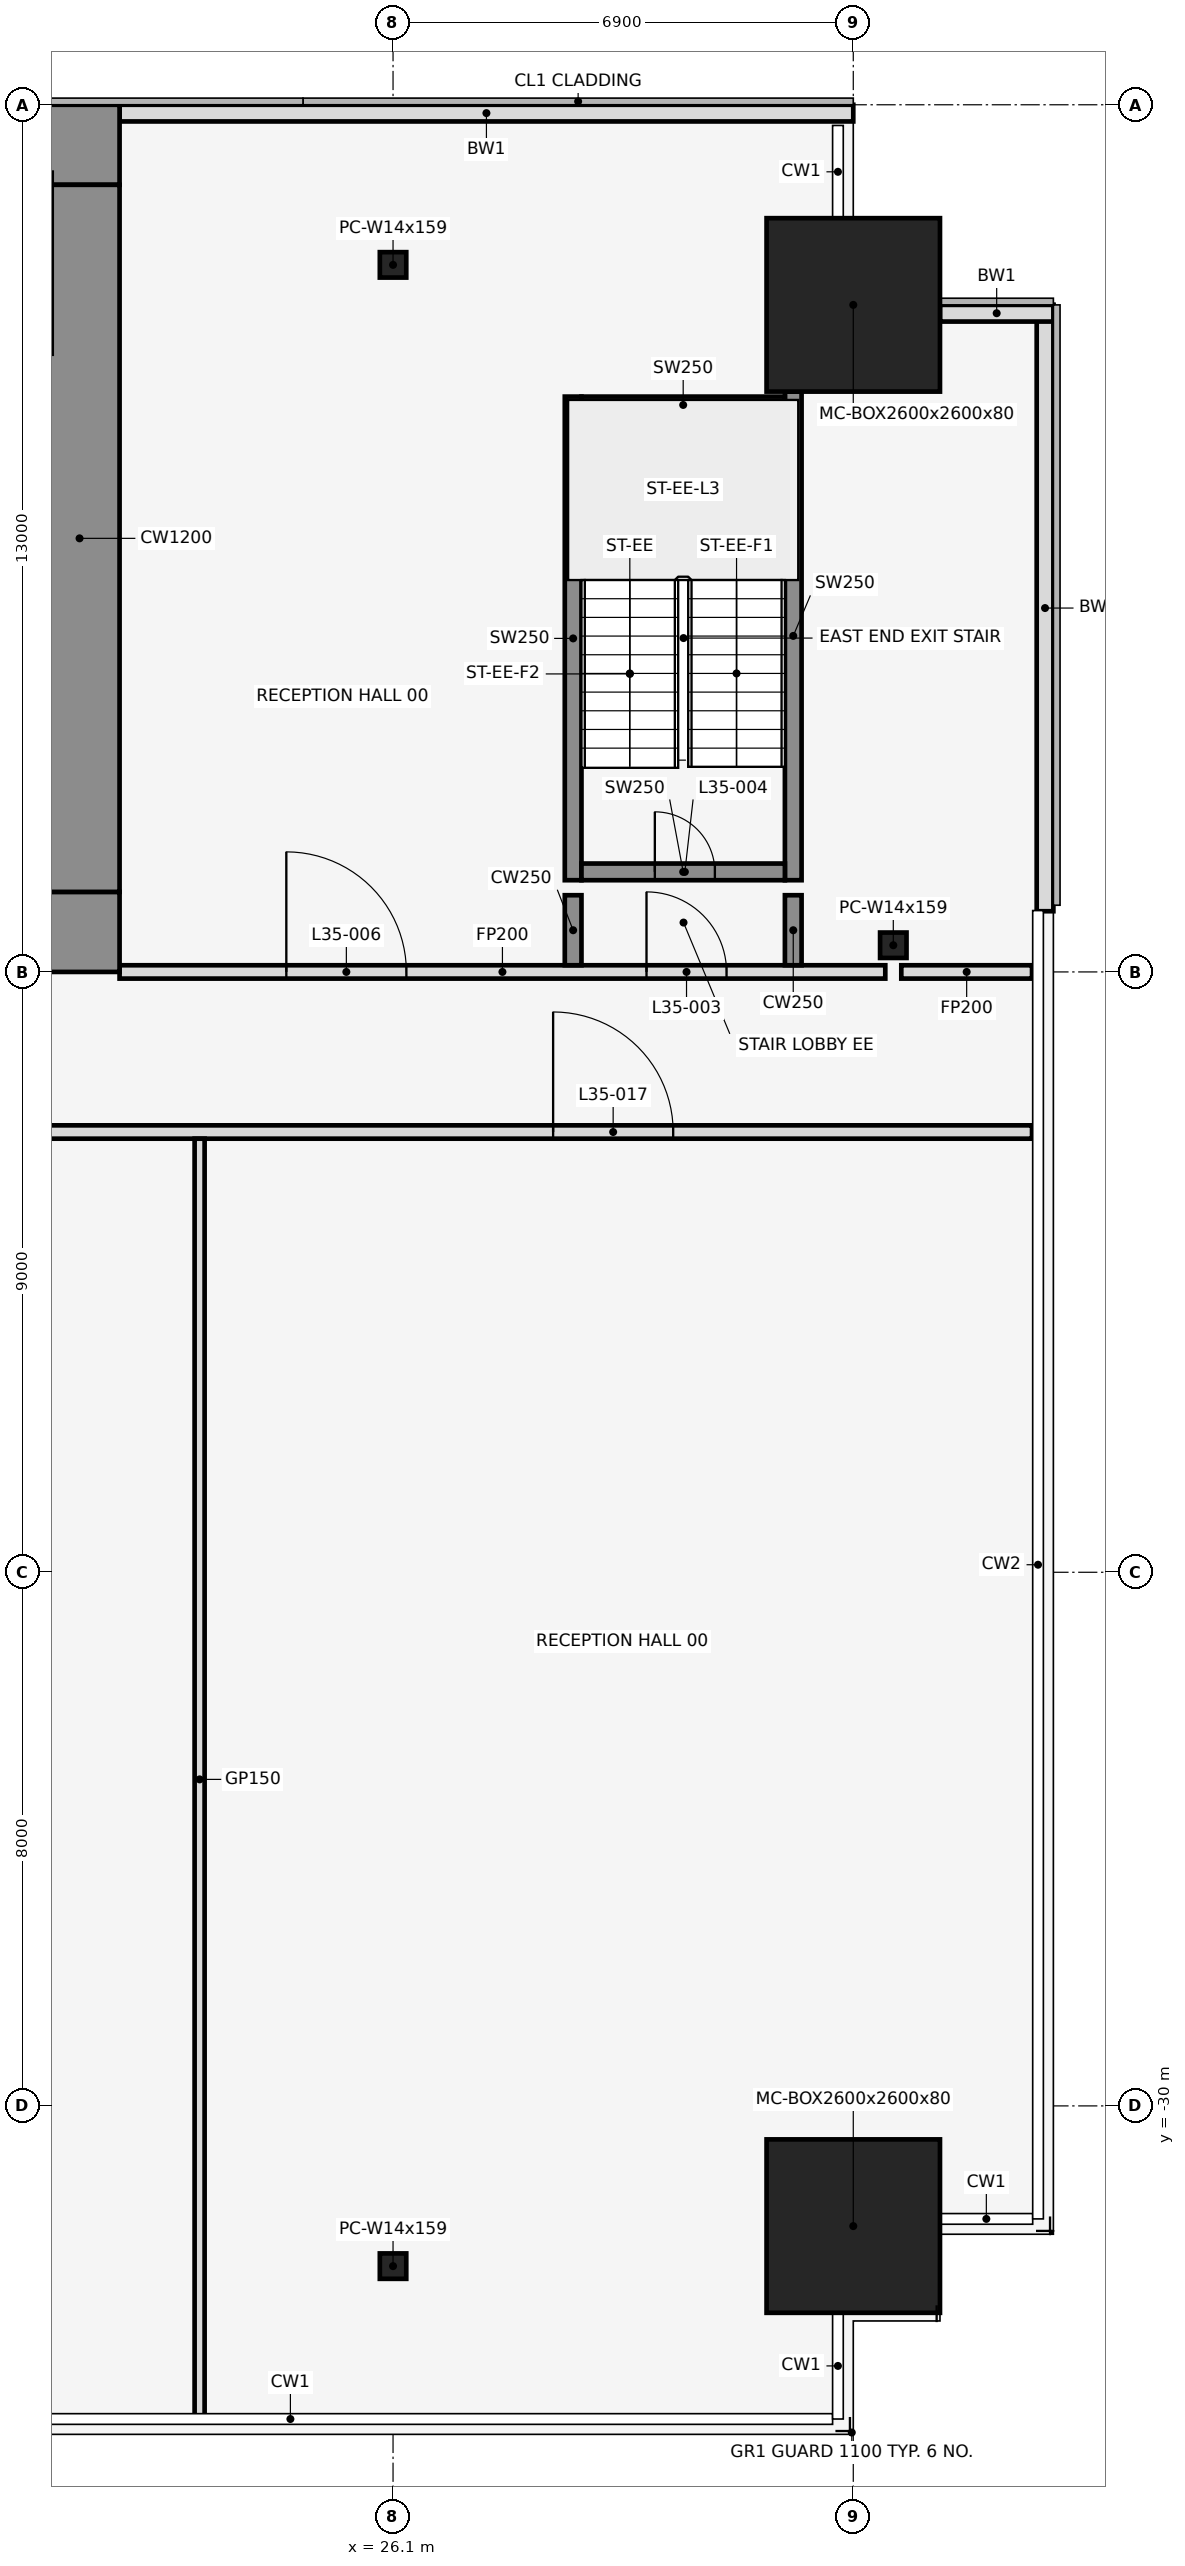
"""IFC4 building model, lengths in metres.
Left out: names, types, materials, properties, quantities, classifications, styles, units other than length and angle.
Written with IfcOpenShell. Run it as: python <this file> out.ifc"""

import sys

from ifc_helpers import new_model, si_unit, direction, frame, frame_2d, origin, origin_2d, place, context, subcontext, project, spatial, rectangle, hollow_rectangle, i_section, extrude, element, fill, save


model = new_model("IFC4")
c1 = context("Model", 3, precision=1e-05, world=origin(), true_north=direction((0.0, 1.0)))
c2 = subcontext(c1, "Body", "Model", "MODEL_VIEW")
j1 = project(units=[si_unit("LENGTHUNIT", "METRE"), si_unit("PLANEANGLEUNIT", "RADIAN")], contexts=[c1])
p1 = place(None, origin())
s1 = spatial("IfcSite", under=j1, at=p1, CompositionType="ELEMENT")
p2 = place(p1, origin())
s2 = spatial("IfcBuilding", under=s1, at=p2, CompositionType="ELEMENT")
p3 = place(p2, frame((0.0, 0.0, 160.9)))
s3 = spatial("IfcBuildingStorey", under=s2, at=p3, CompositionType="ELEMENT", Elevation=160.9)
for number, where, z_axis, x_axis in (
    (1, (26.1, -32.402, 0.0), (0.0, 0.0, 1.0), (1.0, 0.0, 0.0)),
    (2, (26.1, -2.4, 0.0), (0.0, 0.0, 1.0), (1.0, 0.0, 0.0)),
):
    element("IfcColumn", number, at=place(p3, frame(where, z_axis=z_axis, x_axis=x_axis)), inside=s3, PredefinedType="COLUMN", context=c2, shape_type="SweptSolid", body=[
        extrude(i_section(OverallWidth=0.396, OverallDepth=0.381, WebThickness=0.019, FlangeThickness=0.03, at=origin_2d()), origin(), (0.0, 0.0, 1.0), 4.1),
    ])
for number, where, z_axis, x_axis in (
    (3, (33.0, -31.802, 0.0), (0.0, 0.0, 1.0), (1.0, 0.0, 0.0)),
    (4, (33.0, -3.0, 0.0), (0.0, 0.0, 1.0), (1.0, 0.0, 0.0)),
):
    element("IfcColumn", number, at=place(p3, frame(where, z_axis=z_axis, x_axis=x_axis)), inside=s3, PredefinedType="COLUMN", context=c2, shape_type="SweptSolid", body=[
        extrude(hollow_rectangle(XDim=2.6, YDim=2.6, WallThickness=0.08, at=origin_2d()), origin(), (0.0, 0.0, 1.0), 4.1),
    ])
p4 = place(p3, frame((33.6, -12.6, 0.0), z_axis=(0.0, 0.0, 1.0), x_axis=(1.0, 0.0, 0.0)))
e5 = element("IfcColumn", 5, at=p4, inside=s3, PredefinedType="COLUMN", context=c2, shape_type="SweptSolid", body=[
    extrude(i_section(OverallWidth=0.396, OverallDepth=0.381, WebThickness=0.019, FlangeThickness=0.03, at=origin_2d()), origin(), (0.0, 0.0, 1.0), 4.1),
])
p5 = place(p3, frame((33.0, -0.125, 0.0), z_axis=(0.0, 0.0, 1.0), x_axis=(-1.0, 0.0, 0.0)))
e6 = element("IfcWall", 6, at=p5, inside=s3, PredefinedType="STANDARD", context=c2, shape_type="SweptSolid", body=[
    extrude(rectangle(XDim=11.0, YDim=0.25, at=frame_2d((5.5, 0.0))), origin(), (0.0, 0.0, 1.0), 3.95),
])
p6 = place(p3, frame((35.875, -12.09, 0.0), z_axis=(0.0, 0.0, 1.0), x_axis=(0.0, 1.0, 0.0)))
e7 = element("IfcWall", 7, at=p6, inside=s3, PredefinedType="STANDARD", context=c2, shape_type="SweptSolid", body=[
    extrude(rectangle(XDim=9.09, YDim=0.25, at=frame_2d((4.545, 0.0))), origin(), (0.0, 0.0, 1.0), 3.95),
])
p7 = place(p3, frame((36.0, -3.125, 0.0), z_axis=(0.0, 0.0, 1.0), x_axis=(-1.0, 0.0, 0.0)))
e8 = element("IfcWall", 8, at=p7, inside=s3, PredefinedType="STANDARD", context=c2, shape_type="SweptSolid", body=[
    extrude(rectangle(XDim=1.7, YDim=0.25, at=frame_2d((0.85, 0.0))), origin(), (0.0, 0.0, 1.0), 3.95),
])
p8 = place(p3, frame((28.8, -11.625, 0.0), z_axis=(0.0, 0.0, 1.0), x_axis=(0.0, 1.0, 0.0)))
e9 = element("IfcWall", 9, at=p8, inside=s3, PredefinedType="SHEAR", context=c2, shape_type="SweptSolid", body=[
    extrude(rectangle(XDim=7.25, YDim=0.25, at=frame_2d((3.625, 0.0))), origin(), (0.0, 0.0, 1.0), 4.1),
])
p9 = place(p3, frame((32.1, -11.625, 0.0), z_axis=(0.0, 0.0, 1.0), x_axis=(0.0, 1.0, 0.0)))
e10 = element("IfcWall", 10, at=p9, inside=s3, PredefinedType="SHEAR", context=c2, shape_type="SweptSolid", body=[
    extrude(rectangle(XDim=7.325, YDim=0.25, at=frame_2d((3.663, 0.0))), origin(), (0.0, 0.0, 1.0), 4.1),
])
p10 = place(p3, frame((28.925, -11.5, 0.0), z_axis=(0.0, 0.0, 1.0), x_axis=(1.0, 0.0, 0.0)))
e11 = element("IfcWall", 11, at=p10, inside=s3, PredefinedType="SHEAR", context=c2, shape_type="SweptSolid", body=[
    extrude(rectangle(XDim=3.05, YDim=0.25, at=frame_2d((1.525, 0.0))), origin(), (0.0, 0.0, 1.0), 4.1),
])
p11 = place(p10, frame((1.1, 0.0, 0.0)))
e12 = element("IfcOpeningElement", 12, at=p11, cuts=e11, PredefinedType="OPENING", context=c2, shape_type="SweptSolid", body=[
    extrude(rectangle(XDim=0.9, YDim=2.1, at=frame_2d((0.45, 1.05))), frame((0.0, 0.137, 0.0), z_axis=(0.0, -1.0, 0.0), x_axis=(1.0, 0.0, 0.0)), (0.0, 0.0, 1.0), 0.274),
])
p12 = place(p3, frame((28.925, -4.5, 0.0), z_axis=(0.0, 0.0, 1.0), x_axis=(1.0, 0.0, 0.0)))
e13 = element("IfcWall", 13, at=p12, inside=s3, PredefinedType="SHEAR", context=c2, shape_type="SweptSolid", body=[
    extrude(rectangle(XDim=3.05, YDim=0.25, at=frame_2d((1.525, 0.0))), origin(), (0.0, 0.0, 1.0), 4.1),
])
p13 = place(p3, frame((-35.68, -15.4, 0.0), z_axis=(0.0, 0.0, 1.0), x_axis=(1.0, 0.0, 0.0)))
e14 = element("IfcWall", 14, at=p13, inside=s3, PredefinedType="PARTITIONING", context=c2, shape_type="SweptSolid", body=[
    extrude(rectangle(XDim=71.36, YDim=0.2, at=frame_2d((35.68, 0.0))), origin(), (0.0, 0.0, 1.0), 2.841),
])
p14 = place(p13, frame((3.9, 0.0, 0.0)))
e15 = element("IfcOpeningElement", 15, at=p14, cuts=e14, PredefinedType="OPENING", context=c2, shape_type="SweptSolid", body=[
    extrude(rectangle(XDim=1.8, YDim=2.1, at=frame_2d((0.9, 1.05))), frame((0.0, 0.112, 0.0), z_axis=(0.0, -1.0, 0.0), x_axis=(1.0, 0.0, 0.0)), (0.0, 0.0, 1.0), 0.224),
])
p15 = place(p13, frame((13.48, 0.0, 0.0)))
e16 = element("IfcOpeningElement", 16, at=p15, cuts=e14, PredefinedType="OPENING", context=c2, shape_type="SweptSolid", body=[
    extrude(rectangle(XDim=0.9, YDim=2.1, at=frame_2d((0.45, 1.05))), frame((0.0, 0.112, 0.0), z_axis=(0.0, -1.0, 0.0), x_axis=(1.0, 0.0, 0.0)), (0.0, 0.0, 1.0), 0.224),
])
p16 = place(p13, frame((18.78, 0.0, 0.0)))
e17 = element("IfcOpeningElement", 17, at=p16, cuts=e14, PredefinedType="OPENING", context=c2, shape_type="SweptSolid", body=[
    extrude(rectangle(XDim=1.8, YDim=2.1, at=frame_2d((0.9, 1.05))), frame((0.0, 0.112, 0.0), z_axis=(0.0, -1.0, 0.0), x_axis=(1.0, 0.0, 0.0)), (0.0, 0.0, 1.0), 0.224),
])
p17 = place(p13, frame((24.58, 0.0, 0.0)))
e18 = element("IfcOpeningElement", 18, at=p17, cuts=e14, PredefinedType="OPENING", context=c2, shape_type="SweptSolid", body=[
    extrude(rectangle(XDim=1.8, YDim=2.1, at=frame_2d((0.9, 1.05))), frame((0.0, 0.112, 0.0), z_axis=(0.0, -1.0, 0.0), x_axis=(1.0, 0.0, 0.0)), (0.0, 0.0, 1.0), 0.224),
])
p18 = place(p13, frame((34.78, 0.0, 0.0)))
e19 = element("IfcOpeningElement", 19, at=p18, cuts=e14, PredefinedType="OPENING", context=c2, shape_type="SweptSolid", body=[
    extrude(rectangle(XDim=1.8, YDim=2.1, at=frame_2d((0.9, 1.05))), frame((0.0, 0.112, 0.0), z_axis=(0.0, -1.0, 0.0), x_axis=(1.0, 0.0, 0.0)), (0.0, 0.0, 1.0), 0.224),
])
p19 = place(p13, frame((43.48, 0.0, 0.0)))
e20 = element("IfcOpeningElement", 20, at=p19, cuts=e14, PredefinedType="OPENING", context=c2, shape_type="SweptSolid", body=[
    extrude(rectangle(XDim=1.8, YDim=2.1, at=frame_2d((0.9, 1.05))), frame((0.0, 0.112, 0.0), z_axis=(0.0, -1.0, 0.0), x_axis=(1.0, 0.0, 0.0)), (0.0, 0.0, 1.0), 0.224),
])
p20 = place(p13, frame((52.18, 0.0, 0.0)))
e21 = element("IfcOpeningElement", 21, at=p20, cuts=e14, PredefinedType="OPENING", context=c2, shape_type="SweptSolid", body=[
    extrude(rectangle(XDim=1.8, YDim=2.1, at=frame_2d((0.9, 1.05))), frame((0.0, 0.112, 0.0), z_axis=(0.0, -1.0, 0.0), x_axis=(1.0, 0.0, 0.0)), (0.0, 0.0, 1.0), 0.224),
])
p21 = place(p13, frame((64.18, 0.0, 0.0)))
e22 = element("IfcOpeningElement", 22, at=p21, cuts=e14, PredefinedType="OPENING", context=c2, shape_type="SweptSolid", body=[
    extrude(rectangle(XDim=1.8, YDim=2.1, at=frame_2d((0.9, 1.05))), frame((0.0, 0.112, 0.0), z_axis=(0.0, -1.0, 0.0), x_axis=(1.0, 0.0, 0.0)), (0.0, 0.0, 1.0), 0.224),
])
p22 = place(p3, frame((22.0, -13.0, 0.0), z_axis=(0.0, 0.0, 1.0), x_axis=(1.0, 0.0, 0.0)))
e23 = element("IfcWall", 23, at=p22, inside=s3, PredefinedType="PARTITIONING", context=c2, shape_type="SweptSolid", body=[
    extrude(rectangle(XDim=11.48, YDim=0.2, at=frame_2d((5.74, 0.0))), origin(), (0.0, 0.0, 1.0), 2.841),
])
p23 = place(p22, frame((7.9, 0.0, 0.0)))
e24 = element("IfcOpeningElement", 24, at=p23, cuts=e23, PredefinedType="OPENING", context=c2, shape_type="SweptSolid", body=[
    extrude(rectangle(XDim=1.2, YDim=2.1, at=frame_2d((0.6, 1.05))), frame((0.0, 0.112, 0.0), z_axis=(0.0, -1.0, 0.0), x_axis=(1.0, 0.0, 0.0)), (0.0, 0.0, 1.0), 0.224),
])
p24 = place(p22, frame((2.5, 0.0, 0.0)))
e25 = element("IfcOpeningElement", 25, at=p24, cuts=e23, PredefinedType="OPENING", context=c2, shape_type="SweptSolid", body=[
    extrude(rectangle(XDim=1.8, YDim=2.1, at=frame_2d((0.9, 1.05))), frame((0.0, 0.112, 0.0), z_axis=(0.0, -1.0, 0.0), x_axis=(1.0, 0.0, 0.0)), (0.0, 0.0, 1.0), 0.224),
])
p25 = place(p3, frame((33.72, -13.0, 0.0), z_axis=(0.0, 0.0, 1.0), x_axis=(1.0, 0.0, 0.0)))
e26 = element("IfcWall", 26, at=p25, inside=s3, PredefinedType="PARTITIONING", context=c2, shape_type="SweptSolid", body=[
    extrude(rectangle(XDim=1.96, YDim=0.2, at=frame_2d((0.98, 0.0))), origin(), (0.0, 0.0, 1.0), 2.841),
])
p26 = place(p3, frame((23.2, -34.71, 0.0), z_axis=(0.0, 0.0, 1.0), x_axis=(0.0, 1.0, 0.0)))
e27 = element("IfcWall", 27, at=p26, inside=s3, PredefinedType="PARTITIONING", context=c2, shape_type="SweptSolid", body=[
    extrude(rectangle(XDim=19.21, YDim=0.15, at=frame_2d((9.605, 0.0))), origin(), (0.0, 0.0, 1.0), 2.841),
])
for number, where, z_axis, x_axis in (
    (28, (28.8, -12.9, 0.0), (0.0, 0.0, 1.0), (0.0, 1.0, 0.0)),
    (29, (32.1, -12.9, 0.0), (0.0, 0.0, 1.0), (0.0, 1.0, 0.0)),
):
    element("IfcWall", number, at=place(p3, frame(where, z_axis=z_axis, x_axis=x_axis)), inside=s3, PredefinedType="SHEAR", context=c2, shape_type="SweptSolid", body=[
        extrude(rectangle(XDim=1.05, YDim=0.25, at=frame_2d((0.525, 0.0))), origin(), (0.0, 0.0, 1.0), 4.1),
    ])
p27 = place(p3, frame((-22.0, -0.6, 0.0), z_axis=(0.0, 0.0, 1.0), x_axis=(1.0, 0.0, 0.0)))
e30 = element("IfcWall", 30, at=p27, inside=s3, PredefinedType="SHEAR", context=c2, shape_type="SweptSolid", body=[
    extrude(rectangle(XDim=44.0, YDim=1.2, at=frame_2d((22.0, 0.0))), origin(), (0.0, 0.0, 1.0), 4.1),
])
p28 = place(p27, frame((18.55, 0.0, 0.0)))
e31 = element("IfcOpeningElement", 31, at=p28, cuts=e30, PredefinedType="OPENING", context=c2, shape_type="SweptSolid", body=[
    extrude(rectangle(XDim=0.9, YDim=2.1, at=frame_2d((0.45, 1.05))), frame((0.0, 0.612, 0.0), z_axis=(0.0, -1.0, 0.0), x_axis=(1.0, 0.0, 0.0)), (0.0, 0.0, 1.0), 1.224),
])
p29 = place(p27, frame((24.55, 0.0, 0.0)))
e32 = element("IfcOpeningElement", 32, at=p29, cuts=e30, PredefinedType="OPENING", context=c2, shape_type="SweptSolid", body=[
    extrude(rectangle(XDim=0.9, YDim=2.1, at=frame_2d((0.45, 1.05))), frame((0.0, 0.612, 0.0), z_axis=(0.0, -1.0, 0.0), x_axis=(1.0, 0.0, 0.0)), (0.0, 0.0, 1.0), 1.224),
])
p30 = place(p3, frame((-22.0, -12.4, 0.0), z_axis=(0.0, 0.0, 1.0), x_axis=(1.0, 0.0, 0.0)))
e33 = element("IfcWall", 33, at=p30, inside=s3, PredefinedType="SHEAR", context=c2, shape_type="SweptSolid", body=[
    extrude(rectangle(XDim=44.0, YDim=1.2, at=frame_2d((22.0, 0.0))), origin(), (0.0, 0.0, 1.0), 4.1),
])
p31 = place(p30, frame((2.2, 0.0, 0.0)))
e34 = element("IfcOpeningElement", 34, at=p31, cuts=e33, PredefinedType="OPENING", context=c2, shape_type="SweptSolid", body=[
    extrude(rectangle(XDim=1.2, YDim=2.1, at=frame_2d((0.6, 1.05))), frame((0.0, 0.612, 0.0), z_axis=(0.0, -1.0, 0.0), x_axis=(1.0, 0.0, 0.0)), (0.0, 0.0, 1.0), 1.224),
])
p32 = place(p30, frame((21.4, 0.0, 0.0)))
e35 = element("IfcOpeningElement", 35, at=p32, cuts=e33, PredefinedType="OPENING", context=c2, shape_type="SweptSolid", body=[
    extrude(rectangle(XDim=1.2, YDim=2.1, at=frame_2d((0.6, 1.05))), frame((0.0, 0.612, 0.0), z_axis=(0.0, -1.0, 0.0), x_axis=(1.0, 0.0, 0.0)), (0.0, 0.0, 1.0), 1.224),
])
p33 = place(p30, frame((40.6, 0.0, 0.0)))
e36 = element("IfcOpeningElement", 36, at=p33, cuts=e33, PredefinedType="OPENING", context=c2, shape_type="SweptSolid", body=[
    extrude(rectangle(XDim=1.2, YDim=2.1, at=frame_2d((0.6, 1.05))), frame((0.0, 0.612, 0.0), z_axis=(0.0, -1.0, 0.0), x_axis=(1.0, 0.0, 0.0)), (0.0, 0.0, 1.0), 1.224),
])
p34 = place(p30, frame((16.0, 0.0, 0.0)))
e37 = element("IfcOpeningElement", 37, at=p34, cuts=e33, PredefinedType="OPENING", context=c2, shape_type="SweptSolid", body=[
    extrude(rectangle(XDim=1.8, YDim=2.1, at=frame_2d((0.9, 1.05))), frame((0.0, 0.612, 0.0), z_axis=(0.0, -1.0, 0.0), x_axis=(1.0, 0.0, 0.0)), (0.0, 0.0, 1.0), 1.224),
])
p35 = place(p30, frame((6.3, 0.0, 0.0)))
e38 = element("IfcOpeningElement", 38, at=p35, cuts=e33, PredefinedType="OPENING", context=c2, shape_type="SweptSolid", body=[
    extrude(rectangle(XDim=1.2, YDim=2.1, at=frame_2d((0.6, 1.05))), frame((0.0, 0.612, 0.0), z_axis=(0.0, -1.0, 0.0), x_axis=(1.0, 0.0, 0.0)), (0.0, 0.0, 1.0), 1.224),
])
p36 = place(p30, frame((26.2, 0.0, 0.0)))
e39 = element("IfcOpeningElement", 39, at=p36, cuts=e33, PredefinedType="OPENING", context=c2, shape_type="SweptSolid", body=[
    extrude(rectangle(XDim=1.8, YDim=2.1, at=frame_2d((0.9, 1.05))), frame((0.0, 0.612, 0.0), z_axis=(0.0, -1.0, 0.0), x_axis=(1.0, 0.0, 0.0)), (0.0, 0.0, 1.0), 1.224),
])
p37 = place(p30, frame((36.5, 0.0, 0.0)))
e40 = element("IfcOpeningElement", 40, at=p37, cuts=e33, PredefinedType="OPENING", context=c2, shape_type="SweptSolid", body=[
    extrude(rectangle(XDim=1.2, YDim=2.1, at=frame_2d((0.6, 1.05))), frame((0.0, 0.612, 0.0), z_axis=(0.0, -1.0, 0.0), x_axis=(1.0, 0.0, 0.0)), (0.0, 0.0, 1.0), 1.224),
])
p38 = place(p3, frame((21.4, -11.8, 0.0), z_axis=(0.0, 0.0, 1.0), x_axis=(0.0, 1.0, 0.0)))
e41 = element("IfcWall", 41, at=p38, inside=s3, PredefinedType="SHEAR", context=c2, shape_type="SweptSolid", body=[
    extrude(rectangle(XDim=10.6, YDim=1.2, at=frame_2d((5.3, 0.0))), origin(), (0.0, 0.0, 1.0), 4.1),
])
p39 = place(p23, origin())
e42 = element("IfcDoor", 42, at=p39, inside=s3, OperationType="SINGLE_SWING_RIGHT", PredefinedType="DOOR", context=c2, shape_type="SweptSolid", body=[
    extrude(rectangle(XDim=1.2, YDim=2.1, at=frame_2d((0.6, 1.05))), frame((0.0, 0.025, 0.0), z_axis=(0.0, -1.0, 0.0), x_axis=(1.0, 0.0, 0.0)), (0.0, 0.0, 1.0), 0.05),
])
fill(e24, e42)
p40 = place(p11, origin())
e43 = element("IfcDoor", 43, at=p40, inside=s3, OperationType="SINGLE_SWING_LEFT", PredefinedType="DOOR", context=c2, shape_type="SweptSolid", body=[
    extrude(rectangle(XDim=0.9, YDim=2.1, at=frame_2d((0.45, 1.05))), frame((0.0, 0.025, 0.0), z_axis=(0.0, -1.0, 0.0), x_axis=(1.0, 0.0, 0.0)), (0.0, 0.0, 1.0), 0.05),
])
fill(e12, e43)
p41 = place(p24, origin())
e44 = element("IfcDoor", 44, at=p41, inside=s3, OperationType="SINGLE_SWING_LEFT", PredefinedType="DOOR", context=c2, shape_type="SweptSolid", body=[
    extrude(rectangle(XDim=1.8, YDim=2.1, at=frame_2d((0.9, 1.05))), frame((0.0, 0.025, 0.0), z_axis=(0.0, -1.0, 0.0), x_axis=(1.0, 0.0, 0.0)), (0.0, 0.0, 1.0), 0.05),
])
fill(e25, e44)
p42 = place(p21, origin())
e45 = element("IfcDoor", 45, at=p42, inside=s3, OperationType="SINGLE_SWING_LEFT", PredefinedType="DOOR", context=c2, shape_type="SweptSolid", body=[
    extrude(rectangle(XDim=1.8, YDim=2.1, at=frame_2d((0.9, 1.05))), frame((0.0, 0.025, 0.0), z_axis=(0.0, -1.0, 0.0), x_axis=(1.0, 0.0, 0.0)), (0.0, 0.0, 1.0), 0.05),
])
fill(e22, e45)
save(model, sys.argv[1])
